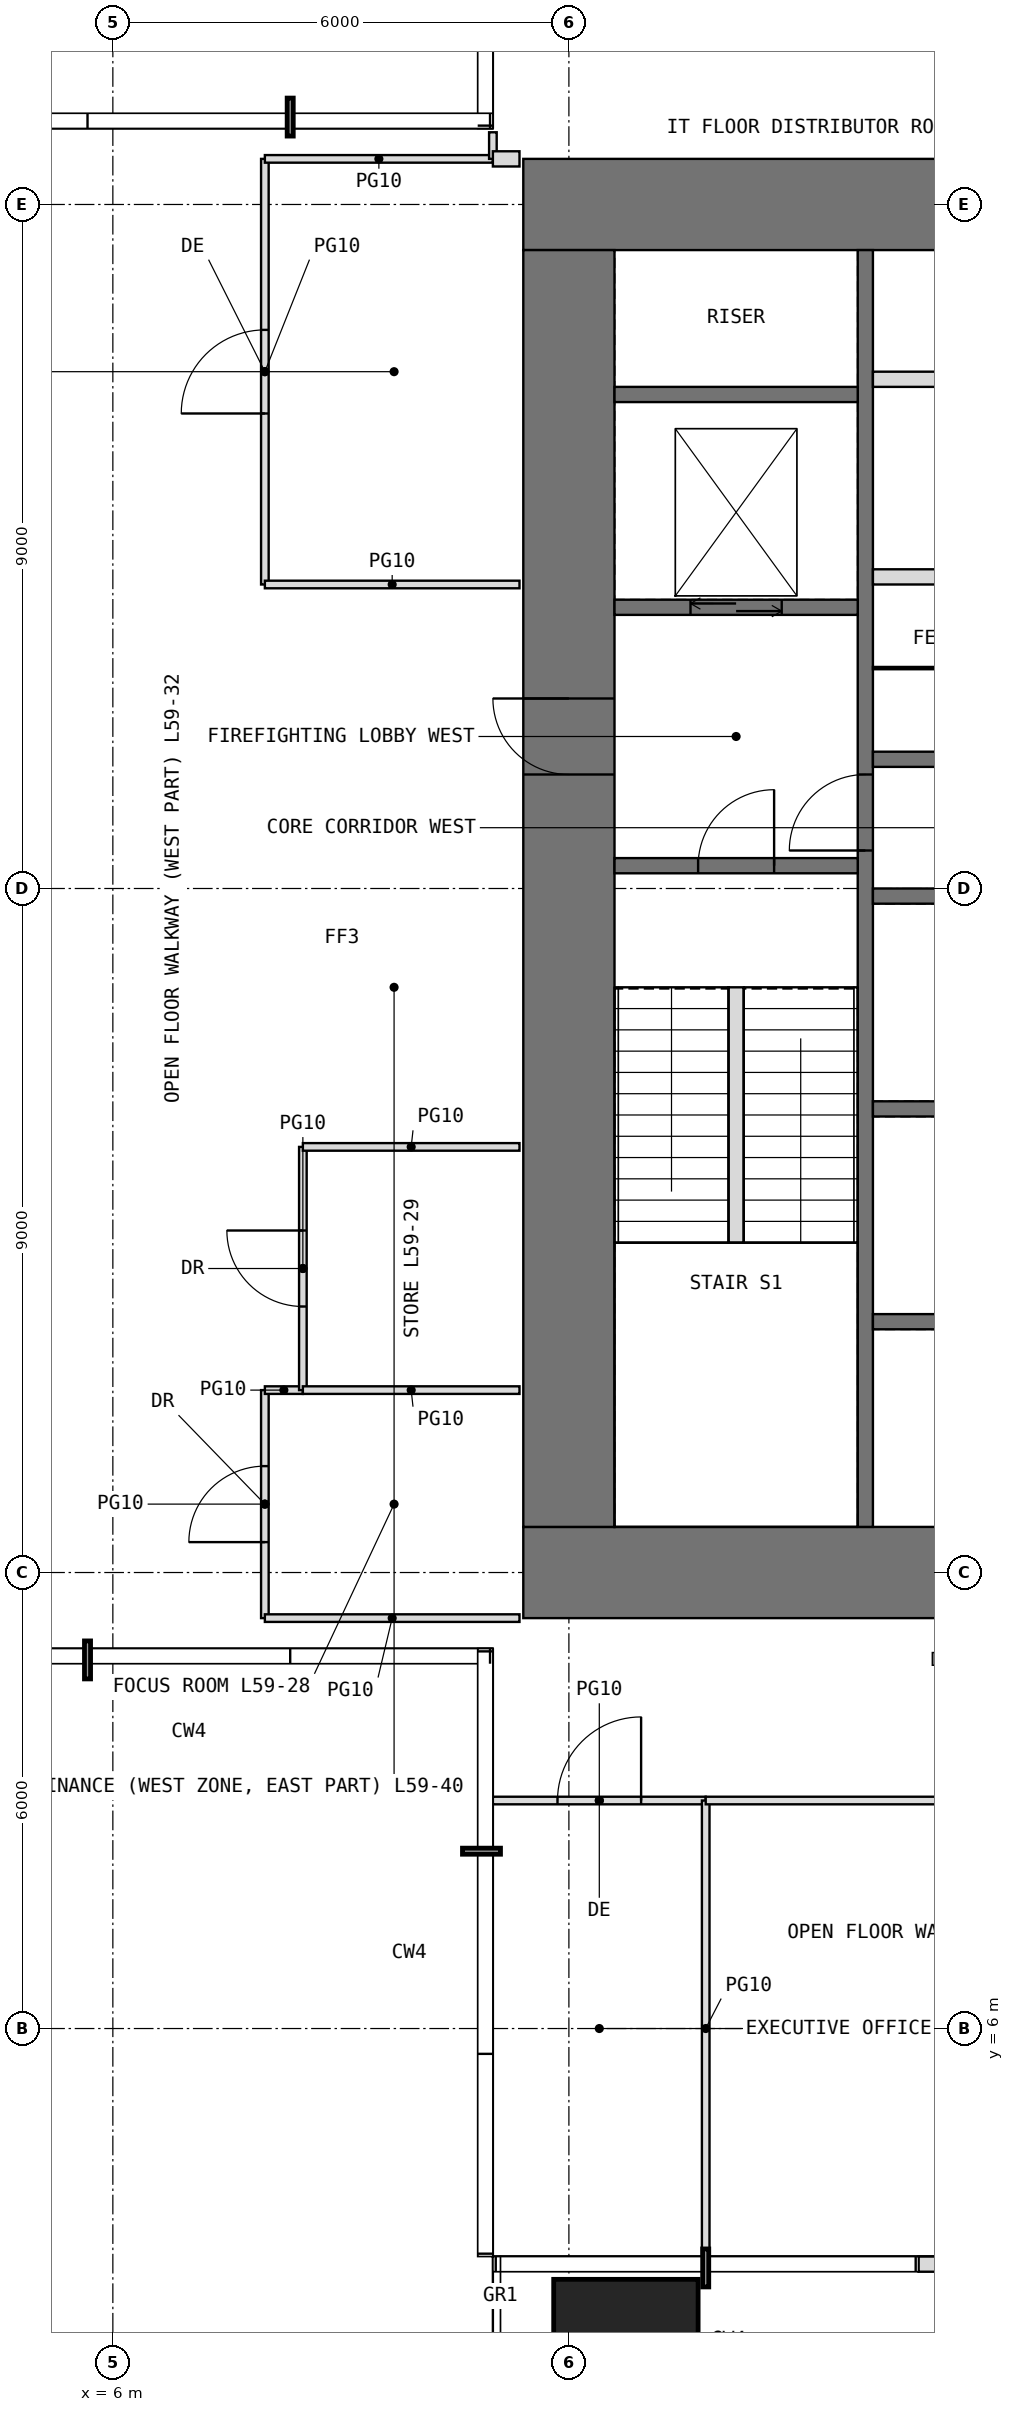
"""IFC4 building model, lengths in metres.
Left out: names, types, materials, properties, quantities, classifications, styles, units other than length and angle.
Written with IfcOpenShell. Run it as: python <this file> out.ifc"""

import sys

from ifc_helpers import new_model, si_unit, direction, frame, frame_2d, origin, origin_2d, place, context, subcontext, project, spatial, rectangle, extrude, element, fill, save


model = new_model("IFC4")
c1 = context("Model", 3, precision=1e-05, world=origin(), true_north=direction((0.0, 1.0)))
c2 = subcontext(c1, "Body", "Model", "MODEL_VIEW")
j1 = project(units=[si_unit("LENGTHUNIT", "METRE"), si_unit("PLANEANGLEUNIT", "RADIAN")], contexts=[c1])
p1 = place(None, origin())
s1 = spatial("IfcSite", under=j1, at=p1, CompositionType="ELEMENT")
p2 = place(p1, origin())
s2 = spatial("IfcBuilding", under=s1, at=p2, CompositionType="ELEMENT")
p3 = place(p2, frame((0.0, 0.0, 248.2)))
s3 = spatial("IfcBuildingStorey", under=s2, at=p3, CompositionType="ELEMENT", Elevation=248.2)
p4 = place(p3, frame((12.75, 1.75, 0.0), z_axis=(0.0, 0.0, 1.0), x_axis=(1.0, 0.0, 0.0)))
e1 = element("IfcColumn", 1, at=p4, inside=s3, PredefinedType="COLUMN", context=c2, shape_type="SweptSolid", body=[
    extrude(rectangle(XDim=1.9, YDim=1.9, at=origin_2d()), origin(), (0.0, 0.0, 1.0), 4.2),
])
p5 = place(p3, frame((16.6, 2.9, 0.0), z_axis=(0.0, 0.0, 1.0), x_axis=(1.0, 0.0, 0.0)))
e2 = element("IfcWall", 2, at=p5, inside=s3, PredefinedType="USERDEFINED", context=c2, shape_type="SweptSolid", body=[
    extrude(rectangle(XDim=4.05, YDim=0.2, at=frame_2d((2.025, 0.0))), origin(), (0.0, 0.0, 1.0), 3.95),
])
p6 = place(p5, frame((0.3, 0.0, 0.0)))
e3 = element("IfcOpeningElement", 3, at=p6, cuts=e2, PredefinedType="OPENING", context=c2, shape_type="SweptSolid", body=[
    extrude(rectangle(XDim=1.0, YDim=2.4, at=frame_2d((0.5, 1.2))), frame((0.0, 0.11, 0.0), z_axis=(0.0, -1.0, 0.0), x_axis=(1.0, 0.0, 0.0)), (0.0, 0.0, 1.0), 0.22),
])
p7 = place(p5, frame((1.6, 0.0, 0.3)))
e4 = element("IfcOpeningElement", 4, at=p7, cuts=e2, PredefinedType="OPENING", context=c2, shape_type="SweptSolid", body=[
    extrude(rectangle(XDim=2.0, YDim=2.7, at=frame_2d((1.0, 1.35))), frame((0.0, 0.11, 0.0), z_axis=(0.0, -1.0, 0.0), x_axis=(1.0, 0.0, 0.0)), (0.0, 0.0, 1.0), 0.22),
])
p8 = place(p3, frame((11.4, 12.0, -0.05), z_axis=(0.0, 0.0, 1.0), x_axis=(1.0, 0.0, 0.0)))
e5 = element("IfcWall", 5, at=p8, inside=s3, PredefinedType="SHEAR", context=c2, shape_type="SweptSolid", body=[
    extrude(rectangle(XDim=19.2, YDim=1.2, at=frame_2d((9.6, 0.0))), origin(), (0.0, 0.0, 1.0), 4.2),
])
p9 = place(p8, frame((8.6, 0.0, 0.05)))
e6 = element("IfcOpeningElement", 6, at=p9, cuts=e5, PredefinedType="OPENING", context=c2, shape_type="SweptSolid", body=[
    extrude(rectangle(XDim=2.0, YDim=2.2, at=frame_2d((1.0, 1.1))), frame((0.0, 0.61, 0.0), z_axis=(0.0, -1.0, 0.0), x_axis=(1.0, 0.0, 0.0)), (0.0, 0.0, 1.0), 1.22),
])
p10 = place(p3, frame((11.4, 30.0, -0.05), z_axis=(0.0, 0.0, 1.0), x_axis=(1.0, 0.0, 0.0)))
e7 = element("IfcWall", 7, at=p10, inside=s3, PredefinedType="SHEAR", context=c2, shape_type="SweptSolid", body=[
    extrude(rectangle(XDim=19.2, YDim=1.2, at=frame_2d((9.6, 0.0))), origin(), (0.0, 0.0, 1.0), 4.2),
])
p11 = place(p10, frame((8.6, 0.0, 0.05)))
e8 = element("IfcOpeningElement", 8, at=p11, cuts=e7, PredefinedType="OPENING", context=c2, shape_type="SweptSolid", body=[
    extrude(rectangle(XDim=2.0, YDim=2.2, at=frame_2d((1.0, 1.1))), frame((0.0, 0.61, 0.0), z_axis=(0.0, -1.0, 0.0), x_axis=(1.0, 0.0, 0.0)), (0.0, 0.0, 1.0), 1.22),
])
p12 = place(p3, frame((12.0, 12.6, -0.05), z_axis=(0.0, 0.0, 1.0), x_axis=(0.0, 1.0, 0.0)))
e9 = element("IfcWall", 9, at=p12, inside=s3, PredefinedType="SHEAR", context=c2, shape_type="SweptSolid", body=[
    extrude(rectangle(XDim=16.8, YDim=1.2, at=frame_2d((8.4, 0.0))), origin(), (0.0, 0.0, 1.0), 4.2),
])
p13 = place(p12, frame((9.9, 0.0, 0.05)))
e10 = element("IfcOpeningElement", 10, at=p13, cuts=e9, PredefinedType="OPENING", context=c2, shape_type="SweptSolid", body=[
    extrude(rectangle(XDim=1.0, YDim=2.2, at=frame_2d((0.5, 1.1))), frame((0.0, 0.61, 0.0), z_axis=(0.0, -1.0, 0.0), x_axis=(1.0, 0.0, 0.0)), (0.0, 0.0, 1.0), 1.22),
])
p14 = place(p3, frame((15.9, 12.6, -0.05), z_axis=(0.0, 0.0, 1.0), x_axis=(0.0, 1.0, 0.0)))
e11 = element("IfcWall", 11, at=p14, inside=s3, PredefinedType="SHEAR", context=c2, shape_type="SweptSolid", body=[
    extrude(rectangle(XDim=16.8, YDim=0.2, at=frame_2d((8.4, 0.0))), origin(), (0.0, 0.0, 1.0), 4.2),
])
p15 = place(p14, frame((8.9, 0.0, 0.05)))
e12 = element("IfcOpeningElement", 12, at=p15, cuts=e11, PredefinedType="OPENING", context=c2, shape_type="SweptSolid", body=[
    extrude(rectangle(XDim=1.0, YDim=2.2, at=frame_2d((0.5, 1.1))), frame((0.0, 0.11, 0.0), z_axis=(0.0, -1.0, 0.0), x_axis=(1.0, 0.0, 0.0)), (0.0, 0.0, 1.0), 0.22),
])
p16 = place(p3, frame((12.6, 21.3, -0.05), z_axis=(0.0, 0.0, 1.0), x_axis=(1.0, 0.0, 0.0)))
e13 = element("IfcWall", 13, at=p16, inside=s3, PredefinedType="SHEAR", context=c2, shape_type="SweptSolid", body=[
    extrude(rectangle(XDim=3.2, YDim=0.2, at=frame_2d((1.6, 0.0))), origin(), (0.0, 0.0, 1.0), 4.2),
])
p17 = place(p16, frame((1.1, 0.0, 0.05)))
e14 = element("IfcOpeningElement", 14, at=p17, cuts=e13, PredefinedType="OPENING", context=c2, shape_type="SweptSolid", body=[
    extrude(rectangle(XDim=1.0, YDim=2.2, at=frame_2d((0.5, 1.1))), frame((0.0, 0.11, 0.0), z_axis=(0.0, -1.0, 0.0), x_axis=(1.0, 0.0, 0.0)), (0.0, 0.0, 1.0), 0.22),
])
p18 = place(p3, frame((12.6, 24.7, -0.05), z_axis=(0.0, 0.0, 1.0), x_axis=(1.0, 0.0, 0.0)))
e15 = element("IfcWall", 15, at=p18, inside=s3, PredefinedType="SHEAR", context=c2, shape_type="SweptSolid", body=[
    extrude(rectangle(XDim=3.2, YDim=0.2, at=frame_2d((1.6, 0.0))), origin(), (0.0, 0.0, 1.0), 4.2),
])
p19 = place(p18, frame((1.0, 0.0, 0.05)))
e16 = element("IfcOpeningElement", 16, at=p19, cuts=e15, PredefinedType="OPENING", context=c2, shape_type="SweptSolid", body=[
    extrude(rectangle(XDim=1.2, YDim=2.2, at=frame_2d((0.6, 1.1))), frame((0.0, 0.11, 0.0), z_axis=(0.0, -1.0, 0.0), x_axis=(1.0, 0.0, 0.0)), (0.0, 0.0, 1.0), 0.22),
])
for number, where, z_axis, x_axis in (
    (17, (12.6, 27.5, -0.05), (0.0, 0.0, 1.0), (1.0, 0.0, 0.0)),
    (18, (16.0, 15.3, -0.05), (0.0, 0.0, 1.0), (1.0, 0.0, 0.0)),
    (19, (16.0, 18.1, -0.05), (0.0, 0.0, 1.0), (1.0, 0.0, 0.0)),
    (20, (16.0, 20.9, -0.05), (0.0, 0.0, 1.0), (1.0, 0.0, 0.0)),
    (21, (16.0, 22.7, -0.05), (0.0, 0.0, 1.0), (1.0, 0.0, 0.0)),
):
    element("IfcWall", number, at=place(p3, frame(where, z_axis=z_axis, x_axis=x_axis)), inside=s3, PredefinedType="SHEAR", context=c2, shape_type="SweptSolid", body=[
        extrude(rectangle(XDim=3.2, YDim=0.2, at=frame_2d((1.6, 0.0))), origin(), (0.0, 0.0, 1.0), 4.2),
    ])
for number, where, z_axis, x_axis in (
    (22, (16.0, 25.1, 0.0), (0.0, 0.0, 1.0), (1.0, 0.0, 0.0)),
    (23, (16.0, 27.7, 0.0), (0.0, 0.0, 1.0), (1.0, 0.0, 0.0)),
):
    element("IfcWall", number, at=place(p3, frame(where, z_axis=z_axis, x_axis=x_axis)), inside=s3, PredefinedType="PARTITIONING", context=c2, shape_type="SweptSolid", body=[
        extrude(rectangle(XDim=3.2, YDim=0.2, at=frame_2d((1.6, 0.0))), origin(), (0.0, 0.0, 1.0), 3.95),
    ])
p20 = place(p3, frame((16.0, 23.9, 0.0), z_axis=(0.0, 0.0, 1.0), x_axis=(1.0, 0.0, 0.0)))
e24 = element("IfcWall", 24, at=p20, inside=s3, PredefinedType="PARTITIONING", context=c2, shape_type="SweptSolid", body=[
    extrude(rectangle(XDim=1.4, YDim=0.03, at=frame_2d((0.7, 0.0))), origin(), (0.0, 0.0, 1.0), 3.95),
])
p21 = place(p3, frame((8.0, 11.4, 0.0), z_axis=(0.0, 0.0, 1.0), x_axis=(0.0, 1.0, 0.0)))
e25 = element("IfcWall", 25, at=p21, inside=s3, PredefinedType="PARTITIONING", context=c2, shape_type="SweptSolid", body=[
    extrude(rectangle(XDim=3.0, YDim=0.1, at=frame_2d((1.5, 0.0))), origin(), (0.0, 0.0, 1.0), 3.95),
])
p22 = place(p21, frame((1.0, 0.0, 0.0)))
e26 = element("IfcOpeningElement", 26, at=p22, cuts=e25, PredefinedType="OPENING", context=c2, shape_type="SweptSolid", body=[
    extrude(rectangle(XDim=1.0, YDim=2.2, at=frame_2d((0.5, 1.1))), frame((0.0, 0.06, 0.0), z_axis=(0.0, -1.0, 0.0), x_axis=(1.0, 0.0, 0.0)), (0.0, 0.0, 1.0), 0.12),
])
p23 = place(p3, frame((8.0, 11.4, 0.0), z_axis=(0.0, 0.0, 1.0), x_axis=(1.0, 0.0, 0.0)))
e27 = element("IfcWall", 27, at=p23, inside=s3, PredefinedType="PARTITIONING", context=c2, shape_type="SweptSolid", body=[
    extrude(rectangle(XDim=3.35, YDim=0.1, at=frame_2d((1.675, 0.0))), origin(), (0.0, 0.0, 1.0), 3.95),
])
p24 = place(p3, frame((8.0, 14.4, 0.0), z_axis=(0.0, 0.0, 1.0), x_axis=(1.0, 0.0, 0.0)))
e28 = element("IfcWall", 28, at=p24, inside=s3, PredefinedType="PARTITIONING", context=c2, shape_type="SweptSolid", body=[
    extrude(rectangle(XDim=0.5, YDim=0.1, at=frame_2d((0.25, 0.0))), origin(), (0.0, 0.0, 1.0), 3.95),
])
p25 = place(p3, frame((8.0, 25.0, 0.0), z_axis=(0.0, 0.0, 1.0), x_axis=(0.0, 1.0, 0.0)))
e29 = element("IfcWall", 29, at=p25, inside=s3, PredefinedType="PARTITIONING", context=c2, shape_type="SweptSolid", body=[
    extrude(rectangle(XDim=5.6, YDim=0.1, at=frame_2d((2.8, 0.0))), origin(), (0.0, 0.0, 1.0), 3.95),
])
p26 = place(p25, frame((2.25, 0.0, 0.0)))
e30 = element("IfcOpeningElement", 30, at=p26, cuts=e29, PredefinedType="OPENING", context=c2, shape_type="SweptSolid", body=[
    extrude(rectangle(XDim=1.1, YDim=2.3, at=frame_2d((0.55, 1.15))), frame((0.0, 0.06, 0.0), z_axis=(0.0, -1.0, 0.0), x_axis=(1.0, 0.0, 0.0)), (0.0, 0.0, 1.0), 0.12),
])
p27 = place(p3, frame((8.0, 25.0, 0.0), z_axis=(0.0, 0.0, 1.0), x_axis=(1.0, 0.0, 0.0)))
e31 = element("IfcWall", 31, at=p27, inside=s3, PredefinedType="PARTITIONING", context=c2, shape_type="SweptSolid", body=[
    extrude(rectangle(XDim=3.35, YDim=0.1, at=frame_2d((1.675, 0.0))), origin(), (0.0, 0.0, 1.0), 3.95),
])
p28 = place(p3, frame((8.0, 30.6, 0.0), z_axis=(0.0, 0.0, 1.0), x_axis=(1.0, 0.0, 0.0)))
e32 = element("IfcWall", 32, at=p28, inside=s3, PredefinedType="PARTITIONING", context=c2, shape_type="SweptSolid", body=[
    extrude(rectangle(XDim=3.0, YDim=0.1, at=frame_2d((1.5, 0.0))), origin(), (0.0, 0.0, 1.0), 3.95),
])
p29 = place(p3, frame((8.5, 14.4, 0.0), z_axis=(0.0, 0.0, 1.0), x_axis=(0.0, 1.0, 0.0)))
e33 = element("IfcWall", 33, at=p29, inside=s3, PredefinedType="PARTITIONING", context=c2, shape_type="SweptSolid", body=[
    extrude(rectangle(XDim=3.2, YDim=0.1, at=frame_2d((1.6, 0.0))), origin(), (0.0, 0.0, 1.0), 3.95),
])
p30 = place(p29, frame((1.1, 0.0, 0.0)))
e34 = element("IfcOpeningElement", 34, at=p30, cuts=e33, PredefinedType="OPENING", context=c2, shape_type="SweptSolid", body=[
    extrude(rectangle(XDim=1.0, YDim=2.2, at=frame_2d((0.5, 1.1))), frame((0.0, 0.06, 0.0), z_axis=(0.0, -1.0, 0.0), x_axis=(1.0, 0.0, 0.0)), (0.0, 0.0, 1.0), 0.12),
])
for number, where, z_axis, x_axis in (
    (35, (8.5, 14.4, 0.0), (0.0, 0.0, 1.0), (1.0, 0.0, 0.0)),
    (36, (8.5, 17.6, 0.0), (0.0, 0.0, 1.0), (1.0, 0.0, 0.0)),
):
    element("IfcWall", number, at=place(p3, frame(where, z_axis=z_axis, x_axis=x_axis)), inside=s3, PredefinedType="PARTITIONING", context=c2, shape_type="SweptSolid", body=[
        extrude(rectangle(XDim=2.85, YDim=0.1, at=frame_2d((1.425, 0.0))), origin(), (0.0, 0.0, 1.0), 3.95),
    ])
p31 = place(p3, frame((11.0, 9.0, 0.0), z_axis=(0.0, 0.0, 1.0), x_axis=(1.0, 0.0, 0.0)))
e37 = element("IfcWall", 37, at=p31, inside=s3, PredefinedType="PARTITIONING", context=c2, shape_type="SweptSolid", body=[
    extrude(rectangle(XDim=2.8, YDim=0.1, at=frame_2d((1.4, 0.0))), origin(), (0.0, 0.0, 1.0), 3.95),
])
p32 = place(p31, frame((0.85, 0.0, 0.0)))
e38 = element("IfcOpeningElement", 38, at=p32, cuts=e37, PredefinedType="OPENING", context=c2, shape_type="SweptSolid", body=[
    extrude(rectangle(XDim=1.1, YDim=2.3, at=frame_2d((0.55, 1.15))), frame((0.0, 0.06, 0.0), z_axis=(0.0, -1.0, 0.0), x_axis=(1.0, 0.0, 0.0)), (0.0, 0.0, 1.0), 0.12),
])
p33 = place(p3, frame((11.0, 30.6, 0.0), z_axis=(0.0, 0.0, 1.0), x_axis=(0.0, 1.0, 0.0)))
e39 = element("IfcWall", 39, at=p33, inside=s3, PredefinedType="PARTITIONING", context=c2, shape_type="SweptSolid", body=[
    extrude(rectangle(XDim=0.35, YDim=0.1, at=frame_2d((0.175, 0.0))), origin(), (0.0, 0.0, 1.0), 3.95),
])
p34 = place(p3, frame((11.0, 30.6, 0.0), z_axis=(0.0, 0.0, 1.0), x_axis=(1.0, 0.0, 0.0)))
e40 = element("IfcWall", 40, at=p34, inside=s3, PredefinedType="PARTITIONING", context=c2, shape_type="SweptSolid", body=[
    extrude(rectangle(XDim=0.35, YDim=0.2, at=frame_2d((0.175, 0.0))), origin(), (0.0, 0.0, 1.0), 3.95),
])
p35 = place(p3, frame((13.8, 3.0, 0.0), z_axis=(0.0, 0.0, 1.0), x_axis=(0.0, 1.0, 0.0)))
e41 = element("IfcWall", 41, at=p35, inside=s3, PredefinedType="PARTITIONING", context=c2, shape_type="SweptSolid", body=[
    extrude(rectangle(XDim=6.0, YDim=0.1, at=frame_2d((3.0, 0.0))), origin(), (0.0, 0.0, 1.0), 3.95),
])
p36 = place(p3, frame((13.8, 9.0, 0.0), z_axis=(0.0, 0.0, 1.0), x_axis=(1.0, 0.0, 0.0)))
e42 = element("IfcWall", 42, at=p36, inside=s3, PredefinedType="PARTITIONING", context=c2, shape_type="SweptSolid", body=[
    extrude(rectangle(XDim=10.3, YDim=0.1, at=frame_2d((5.15, 0.0))), origin(), (0.0, 0.0, 1.0), 3.95),
])
p37 = place(p36, frame((4.4, 0.0, 0.0)))
e43 = element("IfcOpeningElement", 43, at=p37, cuts=e42, PredefinedType="OPENING", context=c2, shape_type="SweptSolid", body=[
    extrude(rectangle(XDim=1.1, YDim=2.3, at=frame_2d((0.55, 1.15))), frame((0.0, 0.06, 0.0), z_axis=(0.0, -1.0, 0.0), x_axis=(1.0, 0.0, 0.0)), (0.0, 0.0, 1.0), 0.12),
])
p38 = place(p3, frame((14.2, 16.34, 0.0), z_axis=(0.0, 0.0, 1.0), x_axis=(0.0, 1.0, 0.0)))
e44 = element("IfcWall", 44, at=p38, inside=s3, PredefinedType="PARTITIONING", context=c2, shape_type="SweptSolid", body=[
    extrude(rectangle(XDim=3.36, YDim=0.2, at=frame_2d((1.68, 0.0))), origin(), (0.0, 0.0, 1.0), 4.2),
])
p39 = place(p13, origin())
e45 = element("IfcDoor", 45, at=p39, inside=s3, OperationType="SINGLE_SWING_RIGHT", PredefinedType="DOOR", context=c2, shape_type="SweptSolid", body=[
    extrude(rectangle(XDim=1.0, YDim=2.2, at=frame_2d((0.5, 1.1))), frame((0.0, 0.025, 0.0), z_axis=(0.0, -1.0, 0.0), x_axis=(1.0, 0.0, 0.0)), (0.0, 0.0, 1.0), 0.05),
])
fill(e10, e45)
p40 = place(p17, origin())
e46 = element("IfcDoor", 46, at=p40, inside=s3, OperationType="SINGLE_SWING_RIGHT", PredefinedType="DOOR", context=c2, shape_type="SweptSolid", body=[
    extrude(rectangle(XDim=1.0, YDim=2.2, at=frame_2d((0.5, 1.1))), frame((0.0, 0.025, 0.0), z_axis=(0.0, -1.0, 0.0), x_axis=(1.0, 0.0, 0.0)), (0.0, 0.0, 1.0), 0.05),
])
fill(e14, e46)
p41 = place(p15, origin())
e47 = element("IfcDoor", 47, at=p41, inside=s3, OperationType="SINGLE_SWING_LEFT", PredefinedType="DOOR", context=c2, shape_type="SweptSolid", body=[
    extrude(rectangle(XDim=1.0, YDim=2.2, at=frame_2d((0.5, 1.1))), frame((0.0, 0.025, 0.0), z_axis=(0.0, -1.0, 0.0), x_axis=(1.0, 0.0, 0.0)), (0.0, 0.0, 1.0), 0.05),
])
fill(e12, e47)
p42 = place(p32, origin())
e48 = element("IfcDoor", 48, at=p42, inside=s3, OperationType="SINGLE_SWING_RIGHT", PredefinedType="DOOR", context=c2, shape_type="SweptSolid", body=[
    extrude(rectangle(XDim=1.1, YDim=2.3, at=frame_2d((0.55, 1.15))), frame((0.0, 0.025, 0.0), z_axis=(0.0, -1.0, 0.0), x_axis=(1.0, 0.0, 0.0)), (0.0, 0.0, 1.0), 0.05),
])
fill(e38, e48)
p43 = place(p22, origin())
e49 = element("IfcDoor", 49, at=p43, inside=s3, OperationType="SINGLE_SWING_LEFT", PredefinedType="DOOR", context=c2, shape_type="SweptSolid", body=[
    extrude(rectangle(XDim=1.0, YDim=2.2, at=frame_2d((0.5, 1.1))), frame((0.0, 0.025, 0.0), z_axis=(0.0, -1.0, 0.0), x_axis=(1.0, 0.0, 0.0)), (0.0, 0.0, 1.0), 0.05),
])
fill(e26, e49)
p44 = place(p30, origin())
e50 = element("IfcDoor", 50, at=p44, inside=s3, OperationType="SINGLE_SWING_RIGHT", PredefinedType="DOOR", context=c2, shape_type="SweptSolid", body=[
    extrude(rectangle(XDim=1.0, YDim=2.2, at=frame_2d((0.5, 1.1))), frame((0.0, 0.025, 0.0), z_axis=(0.0, -1.0, 0.0), x_axis=(1.0, 0.0, 0.0)), (0.0, 0.0, 1.0), 0.05),
])
fill(e34, e50)
p45 = place(p26, origin())
e51 = element("IfcDoor", 51, at=p45, inside=s3, OperationType="SINGLE_SWING_LEFT", PredefinedType="DOOR", context=c2, shape_type="SweptSolid", body=[
    extrude(rectangle(XDim=1.1, YDim=2.3, at=frame_2d((0.55, 1.15))), frame((0.0, 0.025, 0.0), z_axis=(0.0, -1.0, 0.0), x_axis=(1.0, 0.0, 0.0)), (0.0, 0.0, 1.0), 0.05),
])
fill(e30, e51)
p46 = place(p19, origin())
e52 = element("IfcDoor", 52, at=p46, inside=s3, OperationType="DOUBLE_DOOR_SLIDING", PredefinedType="DOOR", context=c2, shape_type="SweptSolid", body=[
    extrude(rectangle(XDim=1.2, YDim=2.2, at=frame_2d((0.6, 1.1))), frame((0.0, 0.025, 0.0), z_axis=(0.0, -1.0, 0.0), x_axis=(1.0, 0.0, 0.0)), (0.0, 0.0, 1.0), 0.05),
])
fill(e16, e52)
save(model, sys.argv[1])
